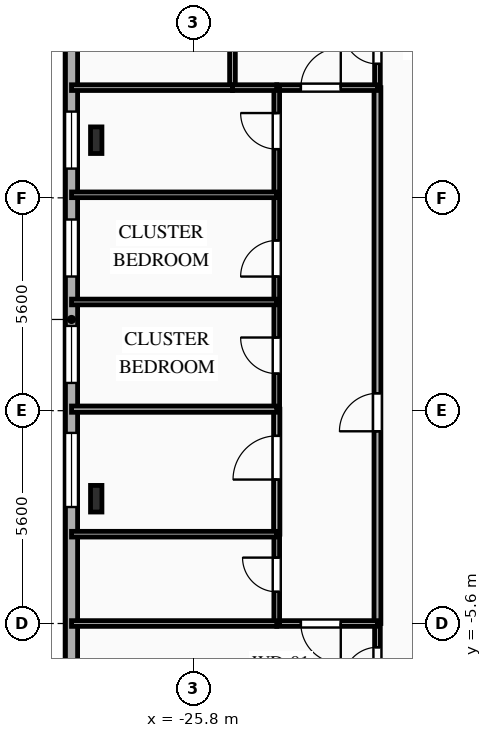
"""IFC4 building model, lengths in metres.
Left out: names, types, materials, properties, quantities, classifications, styles, units other than length and angle.
Written with IfcOpenShell. Run it as: python <this file> out.ifc"""

import sys

from ifc_helpers import new_model, si_unit, direction, frame, frame_2d, origin, origin_2d, place, context, subcontext, project, spatial, rectangle, i_section, extrude, element, fill, save


model = new_model("IFC4")
c1 = context("Model", 3, precision=1e-05, world=origin(), true_north=direction((0.0, 1.0)))
c2 = subcontext(c1, "Body", "Model", "MODEL_VIEW")
j1 = project(units=[si_unit("LENGTHUNIT", "METRE"), si_unit("PLANEANGLEUNIT", "RADIAN")], contexts=[c1])
p1 = place(None, origin())
s1 = spatial("IfcSite", under=j1, at=p1, CompositionType="ELEMENT")
p2 = place(p1, origin())
s2 = spatial("IfcBuilding", under=s1, at=p2, CompositionType="ELEMENT")
p3 = place(p2, frame((0.0, 0.0, 131.0)))
s3 = spatial("IfcBuildingStorey", under=s2, at=p3, CompositionType="ELEMENT", Elevation=131.0)
for number, where, z_axis, x_axis in (
    (1, (-28.35, 7.117, 0.0), (0.0, 0.0, 1.0), (1.0, 0.0, 0.0)),
    (2, (-28.35, -2.317, 0.0), (0.0, 0.0, 1.0), (1.0, 0.0, 0.0)),
):
    element("IfcColumn", number, at=place(p3, frame(where, z_axis=z_axis, x_axis=x_axis)), inside=s3, PredefinedType="COLUMN", context=c2, shape_type="SweptSolid", body=[
        extrude(i_section(OverallWidth=0.3, OverallDepth=0.7, WebThickness=0.017, FlangeThickness=0.032, FilletRadius=0.027, at=origin_2d()), origin(), (0.0, 0.0, 1.0), 3.35),
    ])
p4 = place(p3, frame((-29.0, -12.4, 0.0), z_axis=(0.0, 0.0, 1.0), x_axis=(0.0, 1.0, 0.0)))
e3 = element("IfcWall", 3, at=p4, inside=s3, PredefinedType="SOLIDWALL", context=c2, shape_type="SweptSolid", body=[
    extrude(rectangle(XDim=29.6, YDim=0.32, at=frame_2d((14.8, 0.0))), origin(), (0.0, 0.0, 1.0), 3.04),
])
p5 = place(p4, frame((2.855, 0.0, 0.85)))
e4 = element("IfcOpeningElement", 4, at=p5, cuts=e3, PredefinedType="OPENING", context=c2, shape_type="SweptSolid", body=[
    extrude(rectangle(XDim=1.65, YDim=1.85, at=frame_2d((0.825, 0.925))), frame((0.0, 0.17, 0.0), z_axis=(0.0, -1.0, 0.0), x_axis=(1.0, 0.0, 0.0)), (0.0, 0.0, 1.0), 0.34),
])
p6 = place(p4, frame((9.865, 0.0, 0.85)))
e5 = element("IfcOpeningElement", 5, at=p6, cuts=e3, PredefinedType="OPENING", context=c2, shape_type="SweptSolid", body=[
    extrude(rectangle(XDim=1.95, YDim=1.85, at=frame_2d((0.975, 0.925))), frame((0.0, 0.17, 0.0), z_axis=(0.0, -1.0, 0.0), x_axis=(1.0, 0.0, 0.0)), (0.0, 0.0, 1.0), 0.34),
])
p7 = place(p4, frame((13.13, 0.0, 0.85)))
e6 = element("IfcOpeningElement", 6, at=p7, cuts=e3, PredefinedType="OPENING", context=c2, shape_type="SweptSolid", body=[
    extrude(rectangle(XDim=1.5, YDim=1.85, at=frame_2d((0.75, 0.925))), frame((0.0, 0.17, 0.0), z_axis=(0.0, -1.0, 0.0), x_axis=(1.0, 0.0, 0.0)), (0.0, 0.0, 1.0), 0.34),
])
p8 = place(p4, frame((15.93, 0.0, 0.85)))
e7 = element("IfcOpeningElement", 7, at=p8, cuts=e3, PredefinedType="OPENING", context=c2, shape_type="SweptSolid", body=[
    extrude(rectangle(XDim=1.5, YDim=1.85, at=frame_2d((0.75, 0.925))), frame((0.0, 0.17, 0.0), z_axis=(0.0, -1.0, 0.0), x_axis=(1.0, 0.0, 0.0)), (0.0, 0.0, 1.0), 0.34),
])
p9 = place(p4, frame((18.77, 0.0, 0.85)))
e8 = element("IfcOpeningElement", 8, at=p9, cuts=e3, PredefinedType="OPENING", context=c2, shape_type="SweptSolid", body=[
    extrude(rectangle(XDim=1.5, YDim=1.85, at=frame_2d((0.75, 0.925))), frame((0.0, 0.17, 0.0), z_axis=(0.0, -1.0, 0.0), x_axis=(1.0, 0.0, 0.0)), (0.0, 0.0, 1.0), 0.34),
])
p10 = place(p4, frame((24.255, 0.0, 0.85)))
e9 = element("IfcOpeningElement", 9, at=p10, cuts=e3, PredefinedType="OPENING", context=c2, shape_type="SweptSolid", body=[
    extrude(rectangle(XDim=1.65, YDim=1.85, at=frame_2d((0.825, 0.925))), frame((0.0, 0.17, 0.0), z_axis=(0.0, -1.0, 0.0), x_axis=(1.0, 0.0, 0.0)), (0.0, 0.0, 1.0), 0.34),
])
p11 = place(p3, frame((-20.95, 8.5, 0.0), z_axis=(0.0, 0.0, 1.0), x_axis=(0.0, 1.0, 0.0)))
e10 = element("IfcWall", 10, at=p11, inside=s3, PredefinedType="PARTITIONING", context=c2, shape_type="SweptSolid", body=[
    extrude(rectangle(XDim=2.15, YDim=0.15, at=frame_2d((1.075, 0.0))), origin(), (0.0, 0.0, 1.0), 3.04),
])
p12 = place(p11, frame((0.625, 0.0, 0.0)))
e11 = element("IfcOpeningElement", 11, at=p12, cuts=e10, PredefinedType="OPENING", context=c2, shape_type="SweptSolid", body=[
    extrude(rectangle(XDim=0.9, YDim=2.1, at=frame_2d((0.45, 1.05))), frame((0.0, 0.085, 0.0), z_axis=(0.0, -1.0, 0.0), x_axis=(1.0, 0.0, 0.0)), (0.0, 0.0, 1.0), 0.17),
])
p13 = place(p3, frame((-20.95, -7.75, 0.0), z_axis=(0.0, 0.0, 1.0), x_axis=(0.0, 1.0, 0.0)))
e12 = element("IfcWall", 12, at=p13, inside=s3, PredefinedType="PARTITIONING", context=c2, shape_type="SweptSolid", body=[
    extrude(rectangle(XDim=2.15, YDim=0.15, at=frame_2d((1.075, 0.0))), origin(), (0.0, 0.0, 1.0), 3.04),
])
p14 = place(p13, frame((0.625, 0.0, 0.0)))
e13 = element("IfcOpeningElement", 13, at=p14, cuts=e12, PredefinedType="OPENING", context=c2, shape_type="SweptSolid", body=[
    extrude(rectangle(XDim=0.9, YDim=2.1, at=frame_2d((0.45, 1.05))), frame((0.0, 0.085, 0.0), z_axis=(0.0, -1.0, 0.0), x_axis=(1.0, 0.0, 0.0)), (0.0, 0.0, 1.0), 0.17),
])
p15 = place(p3, frame((-20.95, -5.6, 0.0), z_axis=(0.0, 0.0, 1.0), x_axis=(0.0, 1.0, 0.0)))
e14 = element("IfcWall", 14, at=p15, inside=s3, PredefinedType="PARTITIONING", context=c2, shape_type="SweptSolid", body=[
    extrude(rectangle(XDim=14.1, YDim=0.18, at=frame_2d((7.05, 0.0))), origin(), (0.0, 0.0, 1.0), 3.04),
])
p16 = place(p15, frame((5.058, 0.0, 0.0)))
e15 = element("IfcOpeningElement", 15, at=p16, cuts=e14, PredefinedType="OPENING", context=c2, shape_type="SweptSolid", body=[
    extrude(rectangle(XDim=1.0, YDim=2.15, at=frame_2d((0.5, 1.075))), frame((0.0, 0.1, 0.0), z_axis=(0.0, -1.0, 0.0), x_axis=(1.0, 0.0, 0.0)), (0.0, 0.0, 1.0), 0.2),
])
p17 = place(p3, frame((-23.6, 8.5, 0.0), z_axis=(0.0, 0.0, 1.0), x_axis=(1.0, 0.0, 0.0)))
e16 = element("IfcWall", 16, at=p17, inside=s3, PredefinedType="PARTITIONING", context=c2, shape_type="SweptSolid", body=[
    extrude(rectangle(XDim=2.65, YDim=0.15, at=frame_2d((1.325, 0.0))), origin(), (0.0, 0.0, 1.0), 3.04),
])
p18 = place(p17, frame((0.635, 0.0, 0.0)))
e17 = element("IfcOpeningElement", 17, at=p18, cuts=e16, PredefinedType="OPENING", context=c2, shape_type="SweptSolid", body=[
    extrude(rectangle(XDim=1.05, YDim=2.15, at=frame_2d((0.525, 1.075))), frame((0.0, 0.085, 0.0), z_axis=(0.0, -1.0, 0.0), x_axis=(1.0, 0.0, 0.0)), (0.0, 0.0, 1.0), 0.17),
])
p19 = place(p3, frame((-20.95, -5.6, 0.0), z_axis=(0.0, 0.0, 1.0), x_axis=(-1.0, 0.0, 0.0)))
e18 = element("IfcWall", 18, at=p19, inside=s3, PredefinedType="PARTITIONING", context=c2, shape_type="SweptSolid", body=[
    extrude(rectangle(XDim=2.65, YDim=0.15, at=frame_2d((1.325, 0.0))), origin(), (0.0, 0.0, 1.0), 3.04),
])
p20 = place(p19, frame((0.965, 0.0, 0.0)))
e19 = element("IfcOpeningElement", 19, at=p20, cuts=e18, PredefinedType="OPENING", context=c2, shape_type="SweptSolid", body=[
    extrude(rectangle(XDim=1.05, YDim=2.15, at=frame_2d((0.525, 1.075))), frame((0.0, 0.085, 0.0), z_axis=(0.0, -1.0, 0.0), x_axis=(1.0, 0.0, 0.0)), (0.0, 0.0, 1.0), 0.17),
])
p21 = place(p3, frame((-23.6, -5.6, 0.0), z_axis=(0.0, 0.0, 1.0), x_axis=(0.0, 1.0, 0.0)))
e20 = element("IfcWall", 20, at=p21, inside=s3, PredefinedType="PLUMBINGWALL", context=c2, shape_type="SweptSolid", body=[
    extrude(rectangle(XDim=2.35, YDim=0.15, at=frame_2d((1.175, 0.0))), origin(), (0.0, 0.0, 1.0), 2.695),
])
p22 = place(p21, frame((0.834, 0.0, 0.0)))
e21 = element("IfcOpeningElement", 21, at=p22, cuts=e20, PredefinedType="OPENING", context=c2, shape_type="SweptSolid", body=[
    extrude(rectangle(XDim=0.9, YDim=2.1, at=frame_2d((0.45, 1.05))), frame((0.0, 0.085, 0.0), z_axis=(0.0, -1.0, 0.0), x_axis=(1.0, 0.0, 0.0)), (0.0, 0.0, 1.0), 0.17),
])
p23 = place(p3, frame((-23.6, -3.25, 0.0), z_axis=(0.0, 0.0, 1.0), x_axis=(0.0, 1.0, 0.0)))
e22 = element("IfcWall", 22, at=p23, inside=s3, PredefinedType="PARTITIONING", context=c2, shape_type="SweptSolid", body=[
    extrude(rectangle(XDim=3.29, YDim=0.165, at=frame_2d((1.645, 0.0))), origin(), (0.0, 0.0, 1.0), 2.695),
])
p24 = place(p23, frame((1.438, 0.0, 0.0)))
e23 = element("IfcOpeningElement", 23, at=p24, cuts=e22, PredefinedType="OPENING", context=c2, shape_type="SweptSolid", body=[
    extrude(rectangle(XDim=1.15, YDim=2.15, at=frame_2d((0.575, 1.075))), frame((0.0, 0.093, 0.0), z_axis=(0.0, -1.0, 0.0), x_axis=(1.0, 0.0, 0.0)), (0.0, 0.0, 1.0), 0.185),
])
p25 = place(p3, frame((-23.6, 0.04, 0.0), z_axis=(0.0, 0.0, 1.0), x_axis=(0.0, 1.0, 0.0)))
e24 = element("IfcWall", 24, at=p25, inside=s3, PredefinedType="PARTITIONING", context=c2, shape_type="SweptSolid", body=[
    extrude(rectangle(XDim=2.82, YDim=0.15, at=frame_2d((1.41, 0.0))), origin(), (0.0, 0.0, 1.0), 2.695),
])
p26 = place(p25, frame((0.935, 0.0, 0.0)))
e25 = element("IfcOpeningElement", 25, at=p26, cuts=e24, PredefinedType="OPENING", context=c2, shape_type="SweptSolid", body=[
    extrude(rectangle(XDim=0.95, YDim=2.1, at=frame_2d((0.475, 1.05))), frame((0.0, 0.085, 0.0), z_axis=(0.0, -1.0, 0.0), x_axis=(1.0, 0.0, 0.0)), (0.0, 0.0, 1.0), 0.17),
])
p27 = place(p3, frame((-23.6, 2.86, 0.0), z_axis=(0.0, 0.0, 1.0), x_axis=(0.0, 1.0, 0.0)))
e26 = element("IfcWall", 26, at=p27, inside=s3, PredefinedType="PARTITIONING", context=c2, shape_type="SweptSolid", body=[
    extrude(rectangle(XDim=2.82, YDim=0.15, at=frame_2d((1.41, 0.0))), origin(), (0.0, 0.0, 1.0), 2.695),
])
p28 = place(p27, frame((0.669, 0.0, 0.0)))
e27 = element("IfcOpeningElement", 27, at=p28, cuts=e26, PredefinedType="OPENING", context=c2, shape_type="SweptSolid", body=[
    extrude(rectangle(XDim=0.95, YDim=2.1, at=frame_2d((0.475, 1.05))), frame((0.0, 0.085, 0.0), z_axis=(0.0, -1.0, 0.0), x_axis=(1.0, 0.0, 0.0)), (0.0, 0.0, 1.0), 0.17),
])
p29 = place(p3, frame((-23.6, 5.68, 0.0), z_axis=(0.0, 0.0, 1.0), x_axis=(0.0, 1.0, 0.0)))
e28 = element("IfcWall", 28, at=p29, inside=s3, PredefinedType="PARTITIONING", context=c2, shape_type="SweptSolid", body=[
    extrude(rectangle(XDim=2.82, YDim=0.15, at=frame_2d((1.41, 0.0))), origin(), (0.0, 0.0, 1.0), 2.695),
])
p30 = place(p29, frame((1.201, 0.0, 0.0)))
e29 = element("IfcOpeningElement", 29, at=p30, cuts=e28, PredefinedType="OPENING", context=c2, shape_type="SweptSolid", body=[
    extrude(rectangle(XDim=0.95, YDim=2.1, at=frame_2d((0.475, 1.05))), frame((0.0, 0.085, 0.0), z_axis=(0.0, -1.0, 0.0), x_axis=(1.0, 0.0, 0.0)), (0.0, 0.0, 1.0), 0.17),
])
p31 = place(p3, frame((-24.765, 8.5, 0.0), z_axis=(0.0, 0.0, 1.0), x_axis=(0.0, 1.0, 0.0)))
e30 = element("IfcWall", 30, at=p31, inside=s3, PredefinedType="PARTITIONING", context=c2, shape_type="SweptSolid", body=[
    extrude(rectangle(XDim=11.9, YDim=0.15, at=frame_2d((5.95, 0.0))), origin(), (0.0, 0.0, 1.0), 3.04),
])
p32 = place(p31, frame((3.002, 0.0, 0.0)))
e31 = element("IfcOpeningElement", 31, at=p32, cuts=e30, PredefinedType="OPENING", context=c2, shape_type="SweptSolid", body=[
    extrude(rectangle(XDim=1.05, YDim=2.15, at=frame_2d((0.525, 1.075))), frame((0.0, 0.085, 0.0), z_axis=(0.0, -1.0, 0.0), x_axis=(1.0, 0.0, 0.0)), (0.0, 0.0, 1.0), 0.17),
])
p33 = place(p3, frame((-23.6, 8.5, 0.0), z_axis=(0.0, 0.0, 1.0), x_axis=(-1.0, 0.0, 0.0)))
e32 = element("IfcWall", 32, at=p33, inside=s3, PredefinedType="PARTITIONING", context=c2, shape_type="SweptSolid", body=[
    extrude(rectangle(XDim=1.165, YDim=0.15, at=frame_2d((0.583, 0.0))), origin(), (0.0, 0.0, 1.0), 3.04),
])
p34 = place(p3, frame((-24.765, 8.5, 0.0), z_axis=(0.0, 0.0, 1.0), x_axis=(-1.0, 0.0, 0.0)))
e33 = element("IfcWall", 33, at=p34, inside=s3, PredefinedType="PARTITIONING", context=c2, shape_type="SweptSolid", body=[
    extrude(rectangle(XDim=4.235, YDim=0.15, at=frame_2d((2.118, 0.0))), origin(), (0.0, 0.0, 1.0), 3.04),
])
for number, where, z_axis, x_axis in (
    (34, (-29.0, -5.6, 0.0), (0.0, 0.0, 1.0), (1.0, 0.0, 0.0)),
    (35, (-29.0, -3.25, 0.0), (0.0, 0.0, 1.0), (1.0, 0.0, 0.0)),
):
    element("IfcWall", number, at=place(p3, frame(where, z_axis=z_axis, x_axis=x_axis)), inside=s3, PredefinedType="PLUMBINGWALL", context=c2, shape_type="SweptSolid", body=[
        extrude(rectangle(XDim=5.4, YDim=0.15, at=frame_2d((2.7, 0.0))), origin(), (0.0, 0.0, 1.0), 3.04),
    ])
p35 = place(p3, frame((-29.0, 0.04, 0.0), z_axis=(0.0, 0.0, 1.0), x_axis=(1.0, 0.0, 0.0)))
e36 = element("IfcWall", 36, at=p35, inside=s3, PredefinedType="PARTITIONING", context=c2, shape_type="SweptSolid", body=[
    extrude(rectangle(XDim=5.4, YDim=0.165, at=frame_2d((2.7, 0.0))), origin(), (0.0, 0.0, 1.0), 3.04),
])
for number, where, z_axis, x_axis in (
    (37, (-29.0, 2.86, 0.0), (0.0, 0.0, 1.0), (1.0, 0.0, 0.0)),
    (38, (-29.0, 5.68, 0.0), (0.0, 0.0, 1.0), (1.0, 0.0, 0.0)),
):
    element("IfcWall", number, at=place(p3, frame(where, z_axis=z_axis, x_axis=x_axis)), inside=s3, PredefinedType="PARTITIONING", context=c2, shape_type="SweptSolid", body=[
        extrude(rectangle(XDim=5.4, YDim=0.15, at=frame_2d((2.7, 0.0))), origin(), (0.0, 0.0, 1.0), 3.04),
    ])
p36 = place(p6, origin())
e39 = element("IfcWindow", 39, at=p36, inside=s3, PartitioningType="SINGLE_PANEL", PredefinedType="WINDOW", context=c2, shape_type="SweptSolid", body=[
    extrude(rectangle(XDim=1.95, YDim=1.85, at=frame_2d((0.975, 0.925))), frame((0.0, 0.03, 0.0), z_axis=(0.0, -1.0, 0.0), x_axis=(1.0, 0.0, 0.0)), (0.0, 0.0, 1.0), 0.06),
])
fill(e5, e39)
p37 = place(p7, origin())
e40 = element("IfcWindow", 40, at=p37, inside=s3, PartitioningType="SINGLE_PANEL", PredefinedType="WINDOW", context=c2, shape_type="SweptSolid", body=[
    extrude(rectangle(XDim=1.5, YDim=1.85, at=frame_2d((0.75, 0.925))), frame((0.0, 0.03, 0.0), z_axis=(0.0, -1.0, 0.0), x_axis=(1.0, 0.0, 0.0)), (0.0, 0.0, 1.0), 0.06),
])
fill(e6, e40)
p38 = place(p8, origin())
e41 = element("IfcWindow", 41, at=p38, inside=s3, PartitioningType="SINGLE_PANEL", PredefinedType="WINDOW", context=c2, shape_type="SweptSolid", body=[
    extrude(rectangle(XDim=1.5, YDim=1.85, at=frame_2d((0.75, 0.925))), frame((0.0, 0.03, 0.0), z_axis=(0.0, -1.0, 0.0), x_axis=(1.0, 0.0, 0.0)), (0.0, 0.0, 1.0), 0.06),
])
fill(e7, e41)
p39 = place(p9, origin())
e42 = element("IfcWindow", 42, at=p39, inside=s3, PartitioningType="SINGLE_PANEL", PredefinedType="WINDOW", context=c2, shape_type="SweptSolid", body=[
    extrude(rectangle(XDim=1.5, YDim=1.85, at=frame_2d((0.75, 0.925))), frame((0.0, 0.03, 0.0), z_axis=(0.0, -1.0, 0.0), x_axis=(1.0, 0.0, 0.0)), (0.0, 0.0, 1.0), 0.06),
])
fill(e8, e42)
p40 = place(p12, origin())
e43 = element("IfcDoor", 43, at=p40, inside=s3, OperationType="SINGLE_SWING_RIGHT", PredefinedType="DOOR", context=c2, shape_type="SweptSolid", body=[
    extrude(rectangle(XDim=0.9, YDim=2.1, at=frame_2d((0.45, 1.05))), frame((0.0, 0.025, 0.0), z_axis=(0.0, -1.0, 0.0), x_axis=(1.0, 0.0, 0.0)), (0.0, 0.0, 1.0), 0.05),
])
fill(e11, e43)
p41 = place(p14, origin())
e44 = element("IfcDoor", 44, at=p41, inside=s3, OperationType="SINGLE_SWING_LEFT", PredefinedType="DOOR", context=c2, shape_type="SweptSolid", body=[
    extrude(rectangle(XDim=0.9, YDim=2.1, at=frame_2d((0.45, 1.05))), frame((0.0, 0.025, 0.0), z_axis=(0.0, -1.0, 0.0), x_axis=(1.0, 0.0, 0.0)), (0.0, 0.0, 1.0), 0.05),
])
fill(e13, e44)
p42 = place(p16, origin())
e45 = element("IfcDoor", 45, at=p42, inside=s3, OperationType="SINGLE_SWING_LEFT", PredefinedType="DOOR", context=c2, shape_type="SweptSolid", body=[
    extrude(rectangle(XDim=1.0, YDim=2.15, at=frame_2d((0.5, 1.075))), frame((0.0, 0.025, 0.0), z_axis=(0.0, -1.0, 0.0), x_axis=(1.0, 0.0, 0.0)), (0.0, 0.0, 1.0), 0.05),
])
fill(e15, e45)
p43 = place(p18, origin())
e46 = element("IfcDoor", 46, at=p43, inside=s3, OperationType="SINGLE_SWING_RIGHT", PredefinedType="DOOR", context=c2, shape_type="SweptSolid", body=[
    extrude(rectangle(XDim=1.05, YDim=2.15, at=frame_2d((0.525, 1.075))), frame((0.0, 0.025, 0.0), z_axis=(0.0, -1.0, 0.0), x_axis=(1.0, 0.0, 0.0)), (0.0, 0.0, 1.0), 0.05),
])
fill(e17, e46)
p44 = place(p20, origin())
e47 = element("IfcDoor", 47, at=p44, inside=s3, OperationType="SINGLE_SWING_LEFT", PredefinedType="DOOR", context=c2, shape_type="SweptSolid", body=[
    extrude(rectangle(XDim=1.05, YDim=2.15, at=frame_2d((0.525, 1.075))), frame((0.0, 0.025, 0.0), z_axis=(0.0, -1.0, 0.0), x_axis=(1.0, 0.0, 0.0)), (0.0, 0.0, 1.0), 0.05),
])
fill(e19, e47)
p45 = place(p22, origin())
e48 = element("IfcDoor", 48, at=p45, inside=s3, OperationType="SINGLE_SWING_RIGHT", PredefinedType="DOOR", context=c2, shape_type="SweptSolid", body=[
    extrude(rectangle(XDim=0.9, YDim=2.1, at=frame_2d((0.45, 1.05))), frame((0.0, 0.025, 0.0), z_axis=(0.0, -1.0, 0.0), x_axis=(1.0, 0.0, 0.0)), (0.0, 0.0, 1.0), 0.05),
])
fill(e21, e48)
p46 = place(p24, origin())
e49 = element("IfcDoor", 49, at=p46, inside=s3, OperationType="SINGLE_SWING_LEFT", PredefinedType="DOOR", context=c2, shape_type="SweptSolid", body=[
    extrude(rectangle(XDim=1.15, YDim=2.15, at=frame_2d((0.575, 1.075))), frame((0.0, 0.025, 0.0), z_axis=(0.0, -1.0, 0.0), x_axis=(1.0, 0.0, 0.0)), (0.0, 0.0, 1.0), 0.05),
])
fill(e23, e49)
p47 = place(p26, origin())
e50 = element("IfcDoor", 50, at=p47, inside=s3, OperationType="SINGLE_SWING_RIGHT", PredefinedType="DOOR", context=c2, shape_type="SweptSolid", body=[
    extrude(rectangle(XDim=0.95, YDim=2.1, at=frame_2d((0.475, 1.05))), frame((0.0, 0.025, 0.0), z_axis=(0.0, -1.0, 0.0), x_axis=(1.0, 0.0, 0.0)), (0.0, 0.0, 1.0), 0.05),
])
fill(e25, e50)
p48 = place(p28, origin())
e51 = element("IfcDoor", 51, at=p48, inside=s3, OperationType="SINGLE_SWING_LEFT", PredefinedType="DOOR", context=c2, shape_type="SweptSolid", body=[
    extrude(rectangle(XDim=0.95, YDim=2.1, at=frame_2d((0.475, 1.05))), frame((0.0, 0.025, 0.0), z_axis=(0.0, -1.0, 0.0), x_axis=(1.0, 0.0, 0.0)), (0.0, 0.0, 1.0), 0.05),
])
fill(e27, e51)
p49 = place(p30, origin())
e52 = element("IfcDoor", 52, at=p49, inside=s3, OperationType="SINGLE_SWING_RIGHT", PredefinedType="DOOR", context=c2, shape_type="SweptSolid", body=[
    extrude(rectangle(XDim=0.95, YDim=2.1, at=frame_2d((0.475, 1.05))), frame((0.0, 0.025, 0.0), z_axis=(0.0, -1.0, 0.0), x_axis=(1.0, 0.0, 0.0)), (0.0, 0.0, 1.0), 0.05),
])
fill(e29, e52)
save(model, sys.argv[1])
